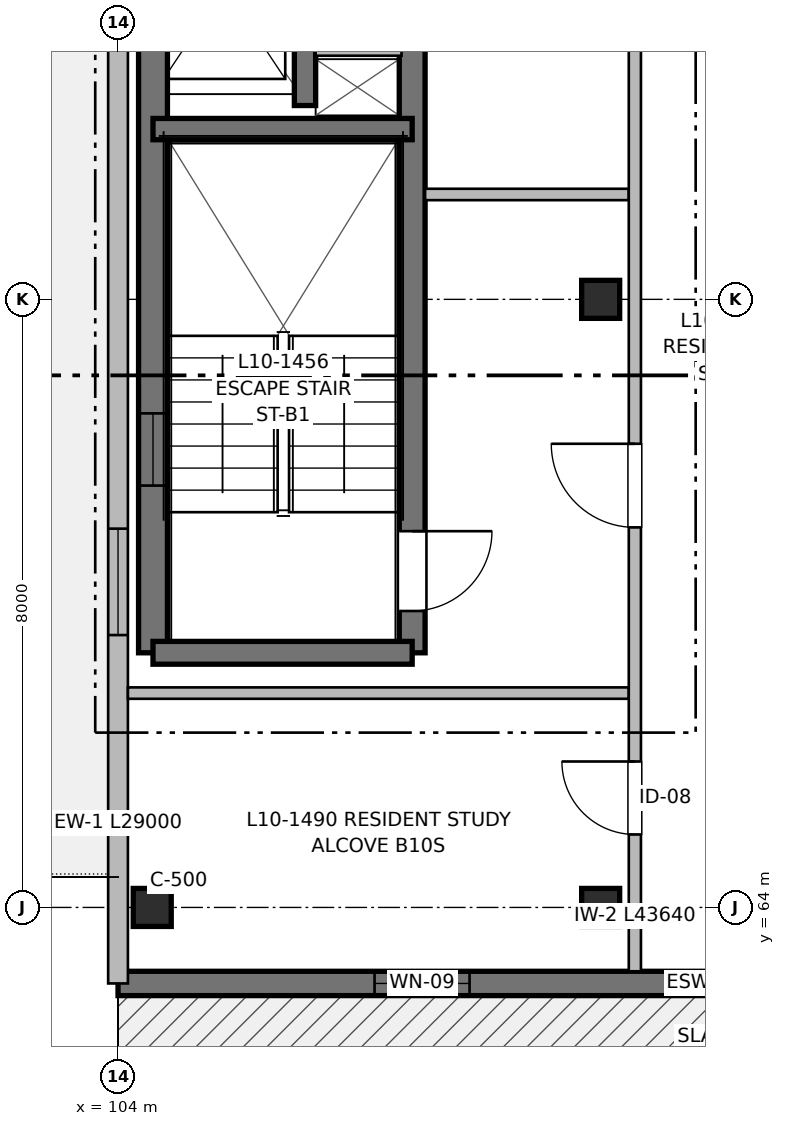
"""IFC4 building model, lengths in metres.
Left out: names, types, materials, properties, quantities, classifications, styles, units other than length and angle.
Written with IfcOpenShell. Run it as: python <this file> out.ifc"""

import sys

from ifc_helpers import new_model, si_unit, direction, frame, frame_2d, origin, origin_2d, place, context, subcontext, project, spatial, rectangle, extrude, element, fill, save


model = new_model("IFC4")
c1 = context("Model", 3, precision=1e-05, world=origin(), true_north=direction((0.0, 1.0)))
c2 = subcontext(c1, "Body", "Model", "MODEL_VIEW")
j1 = project(units=[si_unit("LENGTHUNIT", "METRE"), si_unit("PLANEANGLEUNIT", "RADIAN")], contexts=[c1])
p1 = place(None, origin())
s1 = spatial("IfcSite", under=j1, at=p1, CompositionType="ELEMENT")
p2 = place(p1, origin())
s2 = spatial("IfcBuilding", under=s1, at=p2, CompositionType="ELEMENT")
p3 = place(p2, frame((0.0, 0.0, 32.96)))
s3 = spatial("IfcBuildingStorey", under=s2, at=p3, CompositionType="ELEMENT", Elevation=32.96)
for number, where, z_axis, x_axis in (
    (1, (104.45, 64.0, 0.0), (0.0, 0.0, 1.0), (1.0, 0.0, 0.0)),
    (2, (110.35, 64.0, 0.0), (0.0, 0.0, 1.0), (1.0, 0.0, 0.0)),
    (3, (110.35, 72.0, 0.0), (0.0, 0.0, 1.0), (1.0, 0.0, 0.0)),
):
    element("IfcColumn", number, at=place(p3, frame(where, z_axis=z_axis, x_axis=x_axis)), inside=s3, PredefinedType="COLUMN", context=c2, shape_type="SweptSolid", body=[
        extrude(rectangle(XDim=0.5, YDim=0.5, at=origin_2d()), origin(), (0.0, 0.0, 1.0), 3.2),
    ])
p4 = place(p3, frame((104.46, 67.35, 0.0), z_axis=(0.0, 0.0, 1.0), x_axis=(0.0, 1.0, 0.0)))
e4 = element("IfcWall", 4, at=p4, inside=s3, PredefinedType="SHEAR", context=c2, shape_type="SweptSolid", body=[
    extrude(rectangle(XDim=12.45, YDim=0.38, at=frame_2d((6.225, 0.0))), origin(), (0.0, 0.0, 1.0), 3.2),
])
p5 = place(p4, frame((2.2, 0.0, 0.97)))
e5 = element("IfcOpeningElement", 5, at=p5, cuts=e4, PredefinedType="OPENING", context=c2, shape_type="SweptSolid", body=[
    extrude(rectangle(XDim=0.95, YDim=1.25, at=frame_2d((0.475, 0.625))), frame((0.0, 0.2, 0.0), z_axis=(0.0, -1.0, 0.0), x_axis=(1.0, 0.0, 0.0)), (0.0, 0.0, 1.0), 0.4),
])
p6 = place(p3, frame((107.87, 79.8, 0.0), z_axis=(0.0, 0.0, 1.0), x_axis=(0.0, -1.0, 0.0)))
e6 = element("IfcWall", 6, at=p6, inside=s3, PredefinedType="SHEAR", context=c2, shape_type="SweptSolid", body=[
    extrude(rectangle(XDim=12.45, YDim=0.34, at=frame_2d((6.225, 0.0))), origin(), (0.0, 0.0, 1.0), 3.2),
])
p7 = place(p6, frame((10.85, 0.0, 0.0)))
e7 = element("IfcOpeningElement", 7, at=p7, cuts=e6, PredefinedType="OPENING", context=c2, shape_type="SweptSolid", body=[
    extrude(rectangle(XDim=1.05, YDim=2.15, at=frame_2d((0.525, 1.075))), frame((0.0, 0.18, 0.0), z_axis=(0.0, -1.0, 0.0), x_axis=(1.0, 0.0, 0.0)), (0.0, 0.0, 1.0), 0.36),
])
p8 = place(p3, frame((107.87, 67.35, 0.0), z_axis=(0.0, 0.0, 1.0), x_axis=(-1.0, 0.0, 0.0)))
e8 = element("IfcWall", 8, at=p8, inside=s3, PredefinedType="SHEAR", context=c2, shape_type="SweptSolid", body=[
    extrude(rectangle(XDim=3.41, YDim=0.3, at=frame_2d((1.705, 0.0))), origin(), (0.0, 0.0, 1.0), 3.2),
])
p9 = place(p3, frame((104.46, 74.24, 0.0), z_axis=(0.0, 0.0, 1.0), x_axis=(1.0, 0.0, 0.0)))
e9 = element("IfcWall", 9, at=p9, inside=s3, PredefinedType="SHEAR", context=c2, shape_type="SweptSolid", body=[
    extrude(rectangle(XDim=3.41, YDim=0.28, at=frame_2d((1.705, 0.0))), origin(), (0.0, 0.0, 1.0), 3.2),
])
p10 = place(p3, frame((106.46, 74.55, 0.0), z_axis=(0.0, 0.0, 1.0), x_axis=(0.0, 1.0, 0.0)))
e10 = element("IfcWall", 10, at=p10, inside=s3, PredefinedType="SHEAR", context=c2, shape_type="SweptSolid", body=[
    extrude(rectangle(XDim=5.25, YDim=0.28, at=frame_2d((2.625, 0.0))), origin(), (0.0, 0.0, 1.0), 3.2),
])
p11 = place(p10, frame((1.15, 0.0, 0.0)))
e11 = element("IfcOpeningElement", 11, at=p11, cuts=e10, PredefinedType="OPENING", context=c2, shape_type="SweptSolid", body=[
    extrude(rectangle(XDim=1.0, YDim=2.15, at=frame_2d((0.5, 1.075))), frame((0.0, 0.15, 0.0), z_axis=(0.0, -1.0, 0.0), x_axis=(1.0, 0.0, 0.0)), (0.0, 0.0, 1.0), 0.3),
])
p12 = place(p10, frame((3.85, 0.0, 0.0)))
e12 = element("IfcOpeningElement", 12, at=p12, cuts=e10, PredefinedType="OPENING", context=c2, shape_type="SweptSolid", body=[
    extrude(rectangle(XDim=0.9, YDim=2.15, at=frame_2d((0.45, 1.075))), frame((0.0, 0.15, 0.0), z_axis=(0.0, -1.0, 0.0), x_axis=(1.0, 0.0, 0.0)), (0.0, 0.0, 1.0), 0.3),
])
p13 = place(p3, frame((106.6, 75.28, 0.0), z_axis=(0.0, 0.0, 1.0), x_axis=(1.0, 0.0, 0.0)))
e13 = element("IfcWall", 13, at=p13, inside=s3, PredefinedType="PARTITIONING", context=c2, shape_type="SweptSolid", body=[
    extrude(rectangle(XDim=1.13, YDim=0.15, at=frame_2d((0.565, 0.0))), origin(), (0.0, 0.0, 1.0), 2.95),
])
p14 = place(p3, frame((120.0, 63.0, 0.0), z_axis=(0.0, 0.0, 1.0), x_axis=(-1.0, 0.0, 0.0)))
e14 = element("IfcWall", 14, at=p14, inside=s3, PredefinedType="SHEAR", context=c2, shape_type="SweptSolid", body=[
    extrude(rectangle(XDim=16.0, YDim=0.32, at=frame_2d((8.0, 0.0))), origin(), (0.0, 0.0, 1.0), 2.98),
])
p15 = place(p14, frame((3.0, 0.0, 0.0)))
e15 = element("IfcOpeningElement", 15, at=p15, cuts=e14, PredefinedType="OPENING", context=c2, shape_type="SweptSolid", body=[
    extrude(rectangle(XDim=1.35, YDim=2.2, at=frame_2d((0.675, 1.1))), frame((0.0, 0.17, 0.0), z_axis=(0.0, -1.0, 0.0), x_axis=(1.0, 0.0, 0.0)), (0.0, 0.0, 1.0), 0.34),
])
p16 = place(p14, frame((11.375, 0.0, 0.87)))
e16 = element("IfcOpeningElement", 16, at=p16, cuts=e14, PredefinedType="OPENING", context=c2, shape_type="SweptSolid", body=[
    extrude(rectangle(XDim=1.25, YDim=1.35, at=frame_2d((0.625, 0.675))), frame((0.0, 0.17, 0.0), z_axis=(0.0, -1.0, 0.0), x_axis=(1.0, 0.0, 0.0)), (0.0, 0.0, 1.0), 0.34),
])
p17 = place(p3, frame((104.0, 63.0, 0.0), z_axis=(0.0, 0.0, 1.0), x_axis=(0.0, 1.0, 0.0)))
e17 = element("IfcWall", 17, at=p17, inside=s3, PredefinedType="SOLIDWALL", context=c2, shape_type="SweptSolid", body=[
    extrude(rectangle(XDim=29.0, YDim=0.26, at=frame_2d((14.5, 0.0))), origin(), (0.0, 0.0, 1.0), 2.98),
])
p18 = place(p17, frame((4.583, 0.0, 0.87)))
e18 = element("IfcOpeningElement", 18, at=p18, cuts=e17, PredefinedType="OPENING", context=c2, shape_type="SweptSolid", body=[
    extrude(rectangle(XDim=1.4, YDim=1.35, at=frame_2d((0.7, 0.675))), frame((0.0, 0.14, 0.0), z_axis=(0.0, -1.0, 0.0), x_axis=(1.0, 0.0, 0.0)), (0.0, 0.0, 1.0), 0.28),
])
p19 = place(p17, frame((13.025, 0.0, 0.87)))
e19 = element("IfcOpeningElement", 19, at=p19, cuts=e17, PredefinedType="OPENING", context=c2, shape_type="SweptSolid", body=[
    extrude(rectangle(XDim=1.25, YDim=1.35, at=frame_2d((0.625, 0.675))), frame((0.0, 0.14, 0.0), z_axis=(0.0, -1.0, 0.0), x_axis=(1.0, 0.0, 0.0)), (0.0, 0.0, 1.0), 0.28),
])
p20 = place(p17, frame((23.167, 0.0, 0.0)))
e20 = element("IfcOpeningElement", 20, at=p20, cuts=e17, PredefinedType="OPENING", context=c2, shape_type="SweptSolid", body=[
    extrude(rectangle(XDim=1.2, YDim=2.2, at=frame_2d((0.6, 1.1))), frame((0.0, 0.14, 0.0), z_axis=(0.0, -1.0, 0.0), x_axis=(1.0, 0.0, 0.0)), (0.0, 0.0, 1.0), 0.28),
])
p21 = place(p17, frame((25.467, 0.0, 0.72)))
e21 = element("IfcOpeningElement", 21, at=p21, cuts=e17, PredefinedType="OPENING", context=c2, shape_type="SweptSolid", body=[
    extrude(rectangle(XDim=1.8, YDim=1.5, at=frame_2d((0.9, 0.75))), frame((0.0, 0.14, 0.0), z_axis=(0.0, -1.0, 0.0), x_axis=(1.0, 0.0, 0.0)), (0.0, 0.0, 1.0), 0.28),
])
p22 = place(p3, frame((104.13, 66.82, 0.0), z_axis=(0.0, 0.0, 1.0), x_axis=(1.0, 0.0, 0.0)))
e22 = element("IfcWall", 22, at=p22, inside=s3, PredefinedType="PARTITIONING", context=c2, shape_type="SweptSolid", body=[
    extrude(rectangle(XDim=6.59, YDim=0.15, at=frame_2d((3.295, 0.0))), origin(), (0.0, 0.0, 1.0), 2.935),
])
p23 = place(p3, frame((108.04, 73.38, 0.0), z_axis=(0.0, 0.0, 1.0), x_axis=(1.0, 0.0, 0.0)))
e23 = element("IfcWall", 23, at=p23, inside=s3, PredefinedType="PARTITIONING", context=c2, shape_type="SweptSolid", body=[
    extrude(rectangle(XDim=2.68, YDim=0.15, at=frame_2d((1.34, 0.0))), origin(), (0.0, 0.0, 1.0), 2.935),
])
p24 = place(p3, frame((110.8, 63.16, 0.0), z_axis=(0.0, 0.0, 1.0), x_axis=(0.0, 1.0, 0.0)))
e24 = element("IfcWall", 24, at=p24, inside=s3, PredefinedType="PARTITIONING", context=c2, shape_type="SweptSolid", body=[
    extrude(rectangle(XDim=43.64, YDim=0.16, at=frame_2d((21.82, 0.0))), origin(), (0.0, 0.0, 1.0), 2.935),
])
p25 = place(p24, frame((5.84, 0.0, 0.0)))
e25 = element("IfcOpeningElement", 25, at=p25, cuts=e24, PredefinedType="OPENING", context=c2, shape_type="SweptSolid", body=[
    extrude(rectangle(XDim=1.1, YDim=2.15, at=frame_2d((0.55, 1.075))), frame((0.0, 0.09, 0.0), z_axis=(0.0, -1.0, 0.0), x_axis=(1.0, 0.0, 0.0)), (0.0, 0.0, 1.0), 0.18),
])
p26 = place(p24, frame((12.24, 0.0, 0.0)))
e26 = element("IfcOpeningElement", 26, at=p26, cuts=e24, PredefinedType="OPENING", context=c2, shape_type="SweptSolid", body=[
    extrude(rectangle(XDim=1.6, YDim=2.15, at=frame_2d((0.8, 1.075))), frame((0.0, 0.09, 0.0), z_axis=(0.0, -1.0, 0.0), x_axis=(1.0, 0.0, 0.0)), (0.0, 0.0, 1.0), 0.18),
])
p27 = place(p24, frame((1.8, 0.0, 0.0)))
e27 = element("IfcOpeningElement", 27, at=p27, cuts=e24, PredefinedType="OPENING", context=c2, shape_type="SweptSolid", body=[
    extrude(rectangle(XDim=0.96, YDim=2.15, at=frame_2d((0.48, 1.075))), frame((0.0, 0.09, 0.0), z_axis=(0.0, -1.0, 0.0), x_axis=(1.0, 0.0, 0.0)), (0.0, 0.0, 1.0), 0.18),
])
p28 = place(p24, frame((25.745, 0.0, 0.0)))
e28 = element("IfcOpeningElement", 28, at=p28, cuts=e24, PredefinedType="OPENING", context=c2, shape_type="SweptSolid", body=[
    extrude(rectangle(XDim=0.98, YDim=2.15, at=frame_2d((0.49, 1.075))), frame((0.0, 0.09, 0.0), z_axis=(0.0, -1.0, 0.0), x_axis=(1.0, 0.0, 0.0)), (0.0, 0.0, 1.0), 0.18),
])
p29 = place(p24, frame((33.955, 0.0, 0.0)))
e29 = element("IfcOpeningElement", 29, at=p29, cuts=e24, PredefinedType="OPENING", context=c2, shape_type="SweptSolid", body=[
    extrude(rectangle(XDim=0.98, YDim=2.15, at=frame_2d((0.49, 1.075))), frame((0.0, 0.09, 0.0), z_axis=(0.0, -1.0, 0.0), x_axis=(1.0, 0.0, 0.0)), (0.0, 0.0, 1.0), 0.18),
])
p30 = place(p7, origin())
e30 = element("IfcDoor", 30, at=p30, inside=s3, OperationType="SINGLE_SWING_LEFT", PredefinedType="DOOR", context=c2, shape_type="SweptSolid", body=[
    extrude(rectangle(XDim=1.05, YDim=2.15, at=frame_2d((0.525, 1.075))), frame((0.0, 0.025, 0.0), z_axis=(0.0, -1.0, 0.0), x_axis=(1.0, 0.0, 0.0)), (0.0, 0.0, 1.0), 0.05),
])
fill(e7, e30)
p31 = place(p5, origin())
e31 = element("IfcWindow", 31, at=p31, inside=s3, PartitioningType="SINGLE_PANEL", PredefinedType="WINDOW", context=c2, shape_type="SweptSolid", body=[
    extrude(rectangle(XDim=0.95, YDim=1.25, at=frame_2d((0.475, 0.625))), frame((0.0, 0.03, 0.0), z_axis=(0.0, -1.0, 0.0), x_axis=(1.0, 0.0, 0.0)), (0.0, 0.0, 1.0), 0.06),
])
fill(e5, e31)
p32 = place(p16, origin())
e32 = element("IfcWindow", 32, at=p32, inside=s3, PartitioningType="SINGLE_PANEL", PredefinedType="WINDOW", context=c2, shape_type="SweptSolid", body=[
    extrude(rectangle(XDim=1.25, YDim=1.35, at=frame_2d((0.625, 0.675))), frame((0.0, 0.03, 0.0), z_axis=(0.0, -1.0, 0.0), x_axis=(1.0, 0.0, 0.0)), (0.0, 0.0, 1.0), 0.06),
])
fill(e16, e32)
p33 = place(p18, origin())
e33 = element("IfcWindow", 33, at=p33, inside=s3, PartitioningType="SINGLE_PANEL", PredefinedType="WINDOW", context=c2, shape_type="SweptSolid", body=[
    extrude(rectangle(XDim=1.4, YDim=1.35, at=frame_2d((0.7, 0.675))), frame((0.0, 0.03, 0.0), z_axis=(0.0, -1.0, 0.0), x_axis=(1.0, 0.0, 0.0)), (0.0, 0.0, 1.0), 0.06),
])
fill(e18, e33)
p34 = place(p25, origin())
e34 = element("IfcDoor", 34, at=p34, inside=s3, OperationType="SINGLE_SWING_RIGHT", PredefinedType="DOOR", context=c2, shape_type="SweptSolid", body=[
    extrude(rectangle(XDim=1.1, YDim=2.15, at=frame_2d((0.55, 1.075))), frame((0.0, 0.025, 0.0), z_axis=(0.0, -1.0, 0.0), x_axis=(1.0, 0.0, 0.0)), (0.0, 0.0, 1.0), 0.05),
])
fill(e25, e34)
p35 = place(p27, origin())
e35 = element("IfcDoor", 35, at=p35, inside=s3, OperationType="SINGLE_SWING_RIGHT", PredefinedType="DOOR", context=c2, shape_type="SweptSolid", body=[
    extrude(rectangle(XDim=0.96, YDim=2.15, at=frame_2d((0.48, 1.075))), frame((0.0, 0.025, 0.0), z_axis=(0.0, -1.0, 0.0), x_axis=(1.0, 0.0, 0.0)), (0.0, 0.0, 1.0), 0.05),
])
fill(e27, e35)
save(model, sys.argv[1])
